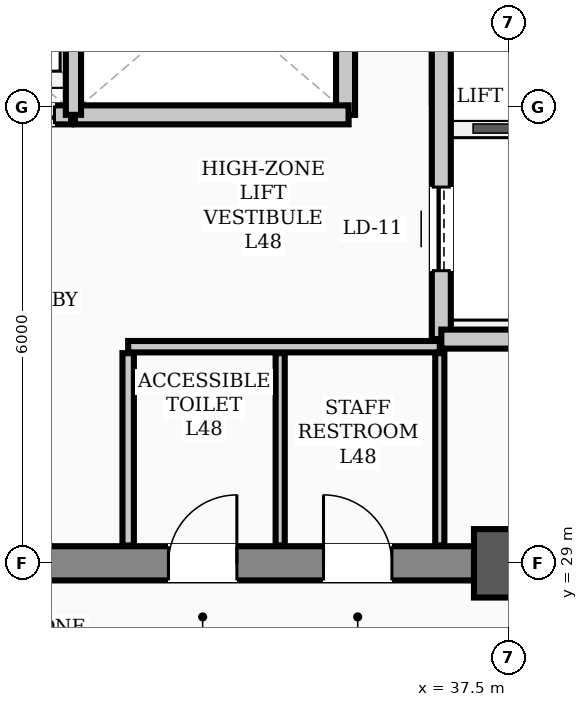
"""IFC4 building model, lengths in metres.
Left out: names, types, materials, properties, quantities, classifications, styles, units other than length and angle.
Written with IfcOpenShell. Run it as: python <this file> out.ifc"""

import sys

from ifc_helpers import new_model, si_unit, direction, frame, frame_2d, origin, origin_2d, place, context, subcontext, project, spatial, rectangle, hollow_rectangle, extrude, element, fill, save


model = new_model("IFC4")
c1 = context("Model", 3, precision=1e-05, world=origin(), true_north=direction((0.0, 1.0)))
c2 = subcontext(c1, "Body", "Model", "MODEL_VIEW")
j1 = project(units=[si_unit("LENGTHUNIT", "METRE"), si_unit("PLANEANGLEUNIT", "RADIAN")], contexts=[c1])
p1 = place(None, origin())
s1 = spatial("IfcSite", under=j1, at=p1, CompositionType="ELEMENT")
p2 = place(p1, origin())
s2 = spatial("IfcBuilding", under=s1, at=p2, CompositionType="ELEMENT")
p3 = place(p2, frame((0.0, 0.0, 192.9)))
s3 = spatial("IfcBuildingStorey", under=s2, at=p3, CompositionType="ELEMENT", Elevation=192.9)
p4 = place(p3, frame((37.5, 29.0, 0.0), z_axis=(0.0, 0.0, 1.0), x_axis=(1.0, 0.0, 0.0)))
e1 = element("IfcColumn", 1, at=p4, inside=s3, PredefinedType="COLUMN", context=c2, shape_type="SweptSolid", body=[
    extrude(hollow_rectangle(XDim=0.9, YDim=0.9, WallThickness=0.035, InnerFilletRadius=0.017, OuterFilletRadius=0.052, at=origin_2d()), origin(), (0.0, 0.0, 1.0), 3.9),
])
p5 = place(p3, frame((13.5, 29.0, 0.0), z_axis=(0.0, 0.0, 1.0), x_axis=(1.0, 0.0, 0.0)))
e2 = element("IfcWall", 2, at=p5, inside=s3, PredefinedType="SHEAR", context=c2, shape_type="SweptSolid", body=[
    extrude(rectangle(XDim=30.5, YDim=0.45, at=frame_2d((15.25, 0.0))), origin(), (0.0, 0.0, 1.0), 3.66),
])
p6 = place(p5, frame((1.75, 0.0, 0.0)))
e3 = element("IfcOpeningElement", 3, at=p6, cuts=e2, PredefinedType="OPENING", context=c2, shape_type="SweptSolid", body=[
    extrude(rectangle(XDim=1.1, YDim=2.08, at=frame_2d((0.55, 1.04))), frame((0.0, 0.235, 0.0), z_axis=(0.0, -1.0, 0.0), x_axis=(1.0, 0.0, 0.0)), (0.0, 0.0, 1.0), 0.47),
])
p7 = place(p5, frame((26.7, 0.0, 0.0)))
e4 = element("IfcOpeningElement", 4, at=p7, cuts=e2, PredefinedType="OPENING", context=c2, shape_type="SweptSolid", body=[
    extrude(rectangle(XDim=1.1, YDim=2.08, at=frame_2d((0.55, 1.04))), frame((0.0, 0.235, 0.0), z_axis=(0.0, -1.0, 0.0), x_axis=(1.0, 0.0, 0.0)), (0.0, 0.0, 1.0), 0.47),
])
p8 = place(p5, frame((6.8, 0.0, 0.0)))
e5 = element("IfcOpeningElement", 5, at=p8, cuts=e2, PredefinedType="OPENING", context=c2, shape_type="SweptSolid", body=[
    extrude(rectangle(XDim=1.1, YDim=2.08, at=frame_2d((0.55, 1.04))), frame((0.0, 0.235, 0.0), z_axis=(0.0, -1.0, 0.0), x_axis=(1.0, 0.0, 0.0)), (0.0, 0.0, 1.0), 0.47),
])
p9 = place(p5, frame((13.2, 0.0, 0.0)))
e6 = element("IfcOpeningElement", 6, at=p9, cuts=e2, PredefinedType="OPENING", context=c2, shape_type="SweptSolid", body=[
    extrude(rectangle(XDim=1.6, YDim=2.08, at=frame_2d((0.8, 1.04))), frame((0.0, 0.235, 0.0), z_axis=(0.0, -1.0, 0.0), x_axis=(1.0, 0.0, 0.0)), (0.0, 0.0, 1.0), 0.47),
])
p10 = place(p5, frame((19.53, 0.0, 0.0)))
e7 = element("IfcOpeningElement", 7, at=p10, cuts=e2, PredefinedType="OPENING", context=c2, shape_type="SweptSolid", body=[
    extrude(rectangle(XDim=0.9, YDim=2.08, at=frame_2d((0.45, 1.04))), frame((0.0, 0.235, 0.0), z_axis=(0.0, -1.0, 0.0), x_axis=(1.0, 0.0, 0.0)), (0.0, 0.0, 1.0), 0.47),
])
p11 = place(p5, frame((21.57, 0.0, 0.0)))
e8 = element("IfcOpeningElement", 8, at=p11, cuts=e2, PredefinedType="OPENING", context=c2, shape_type="SweptSolid", body=[
    extrude(rectangle(XDim=0.9, YDim=2.08, at=frame_2d((0.45, 1.04))), frame((0.0, 0.235, 0.0), z_axis=(0.0, -1.0, 0.0), x_axis=(1.0, 0.0, 0.0)), (0.0, 0.0, 1.0), 0.47),
])
p12 = place(p3, frame((36.62, 31.95, 0.0), z_axis=(0.0, 0.0, 1.0), x_axis=(0.0, 1.0, 0.0)))
e9 = element("IfcWall", 9, at=p12, inside=s3, PredefinedType="STANDARD", context=c2, shape_type="SweptSolid", body=[
    extrude(rectangle(XDim=6.0, YDim=0.25, at=frame_2d((3.0, 0.0))), origin(), (0.0, 0.0, 1.0), 2.24),
])
p13 = place(p12, frame((0.9, 0.0, 0.0)))
e10 = element("IfcOpeningElement", 10, at=p13, cuts=e9, PredefinedType="OPENING", context=c2, shape_type="SweptSolid", body=[
    extrude(rectangle(XDim=1.1, YDim=2.08, at=frame_2d((0.55, 1.04))), frame((0.0, 0.135, 0.0), z_axis=(0.0, -1.0, 0.0), x_axis=(1.0, 0.0, 0.0)), (0.0, 0.0, 1.0), 0.27),
])
p14 = place(p12, frame((4.0, 0.0, 0.0)))
e11 = element("IfcOpeningElement", 11, at=p14, cuts=e9, PredefinedType="OPENING", context=c2, shape_type="SweptSolid", body=[
    extrude(rectangle(XDim=1.1, YDim=2.08, at=frame_2d((0.55, 1.04))), frame((0.0, 0.135, 0.0), z_axis=(0.0, -1.0, 0.0), x_axis=(1.0, 0.0, 0.0)), (0.0, 0.0, 1.0), 0.27),
])
p15 = place(p3, frame((36.62, 31.95, 0.0), z_axis=(0.0, 0.0, 1.0), x_axis=(1.0, 0.0, 0.0)))
e12 = element("IfcWall", 12, at=p15, inside=s3, PredefinedType="STANDARD", context=c2, shape_type="SweptSolid", body=[
    extrude(rectangle(XDim=1.9, YDim=0.25, at=frame_2d((0.95, 0.0))), origin(), (0.0, 0.0, 1.0), 3.48),
])
p16 = place(p3, frame((35.36, 34.9, 0.0), z_axis=(0.0, 0.0, 1.0), x_axis=(0.0, 1.0, 0.0)))
e13 = element("IfcWall", 13, at=p16, inside=s3, PredefinedType="STANDARD", context=c2, shape_type="SweptSolid", body=[
    extrude(rectangle(XDim=3.05, YDim=0.25, at=frame_2d((1.525, 0.0))), origin(), (0.0, 0.0, 1.0), 2.24),
])
p17 = place(p3, frame((28.2, 34.9, 0.0), z_axis=(0.0, 0.0, 1.0), x_axis=(1.0, 0.0, 0.0)))
e14 = element("IfcWall", 14, at=p17, inside=s3, PredefinedType="STANDARD", context=c2, shape_type="SweptSolid", body=[
    extrude(rectangle(XDim=3.55, YDim=0.25, at=frame_2d((1.775, 0.0))), origin(), (0.0, 0.0, 1.0), 3.66),
])
p18 = place(p17, frame((0.23, 0.0, 0.0)))
e15 = element("IfcOpeningElement", 15, at=p18, cuts=e14, PredefinedType="OPENING", context=c2, shape_type="SweptSolid", body=[
    extrude(rectangle(XDim=1.3, YDim=2.08, at=frame_2d((0.65, 1.04))), frame((0.0, 0.135, 0.0), z_axis=(0.0, -1.0, 0.0), x_axis=(1.0, 0.0, 0.0)), (0.0, 0.0, 1.0), 0.27),
])
p19 = place(p17, frame((2.03, 0.0, 0.0)))
e16 = element("IfcOpeningElement", 16, at=p19, cuts=e14, PredefinedType="OPENING", context=c2, shape_type="SweptSolid", body=[
    extrude(rectangle(XDim=1.3, YDim=2.08, at=frame_2d((0.65, 1.04))), frame((0.0, 0.135, 0.0), z_axis=(0.0, -1.0, 0.0), x_axis=(1.0, 0.0, 0.0)), (0.0, 0.0, 1.0), 0.27),
])
p20 = place(p3, frame((31.8, 34.9, 0.0), z_axis=(0.0, 0.0, 1.0), x_axis=(1.0, 0.0, 0.0)))
e17 = element("IfcWall", 17, at=p20, inside=s3, PredefinedType="STANDARD", context=c2, shape_type="SweptSolid", body=[
    extrude(rectangle(XDim=3.6, YDim=0.25, at=frame_2d((1.8, 0.0))), origin(), (0.0, 0.0, 1.0), 3.66),
])
p21 = place(p3, frame((32.5, 31.85, 0.0), z_axis=(0.0, 0.0, 1.0), x_axis=(1.0, 0.0, 0.0)))
e18 = element("IfcWall", 18, at=p21, inside=s3, PredefinedType="PARTITIONING", context=c2, shape_type="SweptSolid", body=[
    extrude(rectangle(XDim=4.1, YDim=0.15, at=frame_2d((2.05, 0.0))), origin(), (0.0, 0.0, 1.0), 3.66),
])
p22 = place(p3, frame((32.5, 29.235, 0.0), z_axis=(0.0, 0.0, 1.0), x_axis=(0.0, 1.0, 0.0)))
e19 = element("IfcWall", 19, at=p22, inside=s3, PredefinedType="PARTITIONING", context=c2, shape_type="SweptSolid", body=[
    extrude(rectangle(XDim=2.53, YDim=0.15, at=frame_2d((1.265, 0.0))), origin(), (0.0, 0.0, 1.0), 2.24),
])
for number, where, z_axis, x_axis in (
    (20, (36.6, 29.235, 0.0), (0.0, 0.0, 1.0), (0.0, 1.0, 0.0)),
    (21, (34.5, 29.235, 0.0), (0.0, 0.0, 1.0), (0.0, 1.0, 0.0)),
):
    element("IfcWall", number, at=place(p3, frame(where, z_axis=z_axis, x_axis=x_axis)), inside=s3, PredefinedType="PARTITIONING", context=c2, shape_type="SweptSolid", body=[
        extrude(rectangle(XDim=2.53, YDim=0.12, at=frame_2d((1.265, 0.0))), origin(), (0.0, 0.0, 1.0), 2.24),
    ])
p23 = place(p3, frame((31.78, 34.9, 0.0), z_axis=(0.0, 0.0, 1.0), x_axis=(0.0, 1.0, 0.0)))
e22 = element("IfcWall", 22, at=p23, inside=s3, PredefinedType="STANDARD", context=c2, shape_type="SweptSolid", body=[
    extrude(rectangle(XDim=3.12, YDim=0.2, at=frame_2d((1.56, 0.0))), origin(), (0.0, 0.0, 1.0), 2.24),
])
p24 = place(p10, origin())
e23 = element("IfcDoor", 23, at=p24, inside=s3, OperationType="SINGLE_SWING_RIGHT", PredefinedType="DOOR", context=c2, shape_type="SweptSolid", body=[
    extrude(rectangle(XDim=0.9, YDim=2.08, at=frame_2d((0.45, 1.04))), frame((0.0, 0.025, 0.0), z_axis=(0.0, -1.0, 0.0), x_axis=(1.0, 0.0, 0.0)), (0.0, 0.0, 1.0), 0.05),
])
fill(e7, e23)
p25 = place(p11, origin())
e24 = element("IfcDoor", 24, at=p25, inside=s3, OperationType="SINGLE_SWING_LEFT", PredefinedType="DOOR", context=c2, shape_type="SweptSolid", body=[
    extrude(rectangle(XDim=0.9, YDim=2.08, at=frame_2d((0.45, 1.04))), frame((0.0, 0.025, 0.0), z_axis=(0.0, -1.0, 0.0), x_axis=(1.0, 0.0, 0.0)), (0.0, 0.0, 1.0), 0.05),
])
fill(e8, e24)
p26 = place(p13, origin())
e25 = element("IfcDoor", 25, at=p26, inside=s3, OperationType="SLIDING_TO_LEFT", PredefinedType="DOOR", context=c2, shape_type="SweptSolid", body=[
    extrude(rectangle(XDim=1.1, YDim=2.08, at=frame_2d((0.55, 1.04))), frame((0.0, 0.025, 0.0), z_axis=(0.0, -1.0, 0.0), x_axis=(1.0, 0.0, 0.0)), (0.0, 0.0, 1.0), 0.05),
])
fill(e10, e25)
p27 = place(p19, origin())
e26 = element("IfcDoor", 26, at=p27, inside=s3, OperationType="DOUBLE_DOOR_SLIDING", PredefinedType="DOOR", context=c2, shape_type="SweptSolid", body=[
    extrude(rectangle(XDim=1.3, YDim=2.08, at=frame_2d((0.65, 1.04))), frame((0.0, 0.025, 0.0), z_axis=(0.0, -1.0, 0.0), x_axis=(1.0, 0.0, 0.0)), (0.0, 0.0, 1.0), 0.05),
])
fill(e16, e26)
save(model, sys.argv[1])
